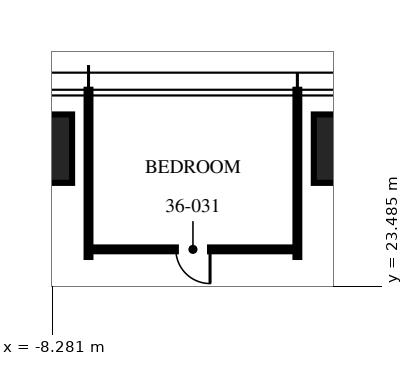
"""IFC4 building model, lengths in metres.
Left out: names, types, materials, properties, quantities, classifications, styles, units other than length and angle.
Written with IfcOpenShell. Run it as: python <this file> out.ifc"""

import sys

from ifc_helpers import new_model, si_unit, direction, frame, frame_2d, origin, origin_2d, place, context, subcontext, project, spatial, rectangle, extrude, element, fill, save


model = new_model("IFC4")
c1 = context("Model", 3, precision=1e-05, world=origin(), true_north=direction((0.0, 1.0)))
c2 = subcontext(c1, "Body", "Model", "MODEL_VIEW")
j1 = project(units=[si_unit("LENGTHUNIT", "METRE"), si_unit("PLANEANGLEUNIT", "RADIAN")], contexts=[c1])
p1 = place(None, origin())
s1 = spatial("IfcSite", under=j1, at=p1, CompositionType="ELEMENT")
p2 = place(p1, origin())
s2 = spatial("IfcBuilding", under=s1, at=p2, CompositionType="ELEMENT")
p3 = place(p2, frame((0.0, 0.0, 144.75)))
s3 = spatial("IfcBuildingStorey", under=s2, at=p3, CompositionType="ELEMENT", Elevation=144.75)
for number, where, z_axis, x_axis in (
    (1, (-9.16, 27.1, 0.0), (0.0, 0.0, 1.0), (1.0, 0.0, 0.0)),
    (2, (0.0, 27.1, 0.0), (0.0, 0.0, 1.0), (1.0, 0.0, 0.0)),
):
    element("IfcColumn", number, at=place(p3, frame(where, z_axis=z_axis, x_axis=x_axis)), inside=s3, PredefinedType="COLUMN", context=c2, shape_type="SweptSolid", body=[
        extrude(rectangle(XDim=2.8, YDim=1.8, at=origin_2d()), origin(), (0.0, 0.0, 1.0), 3.75),
    ])
for number, where, z_axis, x_axis in (
    (3, (-1.832, 24.25, 0.0), (0.0, 0.0, 1.0), (0.0, 1.0, 0.0)),
    (4, (-7.328, 24.25, 0.0), (0.0, 0.0, 1.0), (0.0, 1.0, 0.0)),
):
    element("IfcWall", number, at=place(p3, frame(where, z_axis=z_axis, x_axis=x_axis)), inside=s3, PredefinedType="PARTITIONING", context=c2, shape_type="SweptSolid", body=[
        extrude(rectangle(XDim=4.4, YDim=0.1, at=frame_2d((2.2, 0.0))), origin(), (0.0, 0.0, 1.0), 2.81),
    ])
p4 = place(p3, frame((-1.832, 24.45, 0.0), z_axis=(0.0, 0.0, 1.0), x_axis=(-1.0, 0.0, 0.0)))
e5 = element("IfcWall", 5, at=p4, inside=s3, PredefinedType="PARTITIONING", context=c2, shape_type="SweptSolid", body=[
    extrude(rectangle(XDim=5.496, YDim=0.1, at=frame_2d((2.748, 0.0))), origin(), (0.0, 0.0, 1.0), 2.81),
])
p5 = place(p4, frame((2.298, 0.0, 0.0)))
e6 = element("IfcOpeningElement", 6, at=p5, cuts=e5, PredefinedType="OPENING", context=c2, shape_type="SweptSolid", body=[
    extrude(rectangle(XDim=0.9, YDim=2.1, at=frame_2d((0.45, 1.05))), frame((0.0, 0.06, 0.0), z_axis=(0.0, -1.0, 0.0), x_axis=(1.0, 0.0, 0.0)), (0.0, 0.0, 1.0), 0.12),
])
p6 = place(p5, origin())
e7 = element("IfcDoor", 7, at=p6, inside=s3, OperationType="SINGLE_SWING_LEFT", PredefinedType="DOOR", context=c2, shape_type="SweptSolid", body=[
    extrude(rectangle(XDim=0.9, YDim=2.1, at=frame_2d((0.45, 1.05))), frame((0.0, 0.025, 0.0), z_axis=(0.0, -1.0, 0.0), x_axis=(1.0, 0.0, 0.0)), (0.0, 0.0, 1.0), 0.05),
])
fill(e6, e7)
save(model, sys.argv[1])
